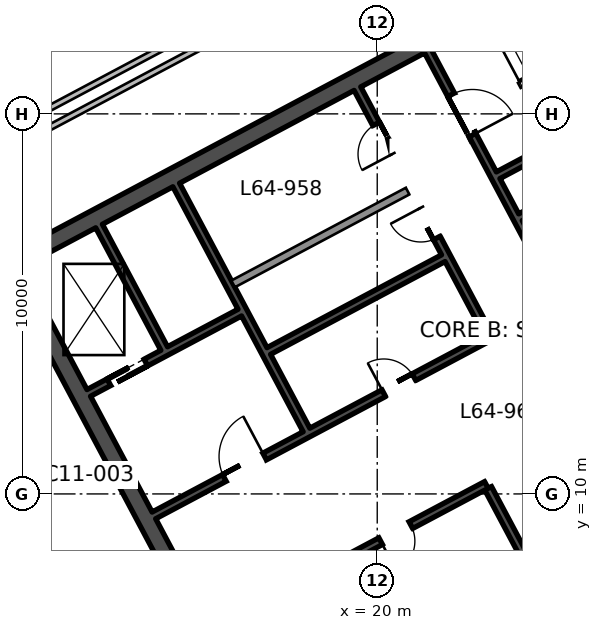
"""IFC4 building model, lengths in metres.
Left out: names, types, materials, properties, quantities, classifications, styles, units other than length and angle.
Written with IfcOpenShell. Run it as: python <this file> out.ifc"""

import sys

from ifc_helpers import new_model, si_unit, direction, frame, frame_2d, origin, place, context, subcontext, project, spatial, rectangle, extrude, element, fill, save


model = new_model("IFC4")
c1 = context("Model", 3, precision=1e-05, world=origin(), true_north=direction((0.0, 1.0)))
c2 = subcontext(c1, "Body", "Model", "MODEL_VIEW")
j1 = project(units=[si_unit("LENGTHUNIT", "METRE"), si_unit("PLANEANGLEUNIT", "RADIAN")], contexts=[c1])
p1 = place(None, origin())
s1 = spatial("IfcSite", under=j1, at=p1, CompositionType="ELEMENT")
p2 = place(p1, origin())
s2 = spatial("IfcBuilding", under=s1, at=p2, CompositionType="ELEMENT")
p3 = place(p2, frame((0.0, 0.0, 285.3)))
s3 = spatial("IfcBuildingStorey", under=s2, at=p3, CompositionType="ELEMENT", Elevation=285.3)
p4 = place(p3, frame((19.207, -0.604, 0.0), z_axis=(0.0, 0.0, 1.0), x_axis=(-0.469467968382, 0.882949504028, 0.0)))
e1 = element("IfcWall", 1, at=p4, inside=s3, PredefinedType="SHEAR", context=c2, shape_type="SweptSolid", body=[
    extrude(rectangle(XDim=19.1, YDim=0.45, at=frame_2d((9.55, 0.0))), origin(), (0.0, 0.0, 1.0), 3.9),
])
p5 = place(p4, frame((6.55, 0.0, 0.0)))
e2 = element("IfcOpeningElement", 2, at=p5, cuts=e1, PredefinedType="OPENING", context=c2, shape_type="SweptSolid", body=[
    extrude(rectangle(XDim=2.4, YDim=2.4, at=frame_2d((1.2, 1.2))), frame((0.0, 0.235, 0.0), z_axis=(0.0, -1.0, 0.0), x_axis=(1.0, 0.0, 0.0)), (0.0, 0.0, 1.0), 0.47),
])
p6 = place(p3, frame((19.3, -0.299, 0.0), z_axis=(0.0, 0.0, 1.0), x_axis=(0.88295276571, 0.46946183394, 0.0)))
e3 = element("IfcWall", 3, at=p6, inside=s3, PredefinedType="SHEAR", context=c2, shape_type="SweptSolid", body=[
    extrude(rectangle(XDim=20.2, YDim=0.45, at=frame_2d((10.1, 0.0))), origin(), (0.0, 0.0, 1.0), 3.9),
])
p7 = place(p3, frame((10.544, 16.167, 0.0), z_axis=(0.0, 0.0, 1.0), x_axis=(0.882947755831, 0.46947125628, 0.0)))
e4 = element("IfcWall", 4, at=p7, inside=s3, PredefinedType="SHEAR", context=c2, shape_type="SweptSolid", body=[
    extrude(rectangle(XDim=20.2, YDim=0.45, at=frame_2d((10.1, 0.0))), origin(), (0.0, 0.0, 1.0), 3.9),
])
p8 = place(p3, frame((14.394, 13.826, 0.0), z_axis=(0.0, 0.0, 1.0), x_axis=(-0.469494272526, 0.882935517501, 0.0)))
e5 = element("IfcWall", 5, at=p8, inside=s3, PredefinedType="SHEAR", context=c2, shape_type="SweptSolid", body=[
    extrude(rectangle(XDim=3.65, YDim=0.2, at=frame_2d((1.825, 0.0))), origin(), (0.0, 0.0, 1.0), 3.9),
])
p9 = place(p3, frame((18.138, 11.683, 0.0), z_axis=(0.0, 0.0, 1.0), x_axis=(-0.469480409012, 0.88294288918, 0.0)))
e6 = element("IfcWall", 6, at=p9, inside=s3, PredefinedType="SHEAR", context=c2, shape_type="SweptSolid", body=[
    extrude(rectangle(XDim=7.3, YDim=0.2, at=frame_2d((3.65, 0.0))), origin(), (0.0, 0.0, 1.0), 3.9),
])
p10 = place(p3, frame((26.346, 3.702, 0.0), z_axis=(0.0, 0.0, 1.0), x_axis=(-0.469480409012, 0.88294288918, 0.0)))
e7 = element("IfcWall", 7, at=p10, inside=s3, PredefinedType="SHEAR", context=c2, shape_type="SweptSolid", body=[
    extrude(rectangle(XDim=7.3, YDim=0.2, at=frame_2d((3.65, 0.0))), origin(), (0.0, 0.0, 1.0), 3.9),
])
p11 = place(p10, frame((1.3, 0.0, 0.0)))
e8 = element("IfcOpeningElement", 8, at=p11, cuts=e7, PredefinedType="OPENING", context=c2, shape_type="SweptSolid", body=[
    extrude(rectangle(XDim=1.2, YDim=2.1, at=frame_2d((0.6, 1.05))), frame((0.0, 0.11, 0.0), z_axis=(0.0, -1.0, 0.0), x_axis=(1.0, 0.0, 0.0)), (0.0, 0.0, 1.0), 0.22),
])
p12 = place(p3, frame((22.906, 14.218, 0.0), z_axis=(0.0, 0.0, 1.0), x_axis=(-0.469480409012, 0.88294288918, 0.0)))
e9 = element("IfcWall", 9, at=p12, inside=s3, PredefinedType="SHEAR", context=c2, shape_type="SweptSolid", body=[
    extrude(rectangle(XDim=7.3, YDim=0.2, at=frame_2d((3.65, 0.0))), origin(), (0.0, 0.0, 1.0), 3.9),
])
p13 = place(p12, frame((2.85, 0.0, 0.0)))
e10 = element("IfcOpeningElement", 10, at=p13, cuts=e9, PredefinedType="OPENING", context=c2, shape_type="SweptSolid", body=[
    extrude(rectangle(XDim=0.9, YDim=2.1, at=frame_2d((0.45, 1.05))), frame((0.0, 0.11, 0.0), z_axis=(0.0, -1.0, 0.0), x_axis=(1.0, 0.0, 0.0)), (0.0, 0.0, 1.0), 0.22),
])
p14 = place(p12, frame((5.35, 0.0, 0.0)))
e11 = element("IfcOpeningElement", 11, at=p14, cuts=e9, PredefinedType="OPENING", context=c2, shape_type="SweptSolid", body=[
    extrude(rectangle(XDim=0.9, YDim=2.1, at=frame_2d((0.45, 1.05))), frame((0.0, 0.11, 0.0), z_axis=(0.0, -1.0, 0.0), x_axis=(1.0, 0.0, 0.0)), (0.0, 0.0, 1.0), 0.22),
])
p15 = place(p3, frame((24.76, 15.204, 0.0), z_axis=(0.0, 0.0, 1.0), x_axis=(-0.469494272526, 0.882935517501, 0.0)))
e12 = element("IfcWall", 12, at=p15, inside=s3, PredefinedType="SHEAR", context=c2, shape_type="SweptSolid", body=[
    extrude(rectangle(XDim=7.3, YDim=0.2, at=frame_2d((3.65, 0.0))), origin(), (0.0, 0.0, 1.0), 3.9),
])
p16 = place(p15, frame((4.8, 0.0, 0.0)))
e13 = element("IfcOpeningElement", 13, at=p16, cuts=e12, PredefinedType="OPENING", context=c2, shape_type="SweptSolid", body=[
    extrude(rectangle(XDim=1.2, YDim=2.1, at=frame_2d((0.6, 1.05))), frame((0.0, 0.11, 0.0), z_axis=(0.0, -1.0, 0.0), x_axis=(1.0, 0.0, 0.0)), (0.0, 0.0, 1.0), 0.22),
])
p17 = place(p3, frame((18.104, 7.701, 0.0), z_axis=(0.0, 0.0, 1.0), x_axis=(0.882952937579, 0.469461510692, 0.0)))
e14 = element("IfcWall", 14, at=p17, inside=s3, PredefinedType="SHEAR", context=c2, shape_type="SweptSolid", body=[
    extrude(rectangle(XDim=5.4, YDim=0.2, at=frame_2d((2.7, 0.0))), origin(), (0.0, 0.0, 1.0), 3.9),
])
p18 = place(p17, frame((2.25, 0.0, 0.0)))
e15 = element("IfcOpeningElement", 15, at=p18, cuts=e14, PredefinedType="OPENING", context=c2, shape_type="SweptSolid", body=[
    extrude(rectangle(XDim=0.9, YDim=2.1, at=frame_2d((0.45, 1.05))), frame((0.0, 0.11, 0.0), z_axis=(0.0, -1.0, 0.0), x_axis=(1.0, 0.0, 0.0)), (0.0, 0.0, 1.0), 0.22),
])
p19 = place(p3, frame((14.124, 9.435, 0.0), z_axis=(0.0, 0.0, 1.0), x_axis=(0.882940221191, 0.469485426614, 0.0)))
e16 = element("IfcWall", 16, at=p19, inside=s3, PredefinedType="SHEAR", context=c2, shape_type="SweptSolid", body=[
    extrude(rectangle(XDim=10.0, YDim=0.2, at=frame_2d((5.0, 0.0))), origin(), (0.0, 0.0, 1.0), 3.9),
])
p20 = place(p19, frame((2.1, 0.0, 0.0)))
e17 = element("IfcOpeningElement", 17, at=p20, cuts=e16, PredefinedType="OPENING", context=c2, shape_type="SweptSolid", body=[
    extrude(rectangle(XDim=1.2, YDim=2.1, at=frame_2d((0.6, 1.05))), frame((0.0, 0.11, 0.0), z_axis=(0.0, -1.0, 0.0), x_axis=(1.0, 0.0, 0.0)), (0.0, 0.0, 1.0), 0.22),
])
p21 = place(p19, frame((6.85, 0.0, 0.0)))
e18 = element("IfcOpeningElement", 18, at=p21, cuts=e16, PredefinedType="OPENING", context=c2, shape_type="SweptSolid", body=[
    extrude(rectangle(XDim=0.9, YDim=2.1, at=frame_2d((0.45, 1.05))), frame((0.0, 0.11, 0.0), z_axis=(0.0, -1.0, 0.0), x_axis=(1.0, 0.0, 0.0)), (0.0, 0.0, 1.0), 0.22),
])
p22 = place(p3, frame((17.147, 13.761, 0.0), z_axis=(0.0, 0.0, 1.0), x_axis=(0.882964314875, 0.469440111896, 0.0)))
e19 = element("IfcWall", 19, at=p22, inside=s3, PredefinedType="SHEAR", context=c2, shape_type="SweptSolid", body=[
    extrude(rectangle(XDim=5.2, YDim=0.2, at=frame_2d((2.6, 0.0))), origin(), (0.0, 0.0, 1.0), 3.9),
])
p23 = place(p3, frame((23.769, 17.282, 0.0), z_axis=(0.0, 0.0, 1.0), x_axis=(0.882940221191, 0.469485426614, 0.0)))
e20 = element("IfcWall", 20, at=p23, inside=s3, PredefinedType="SHEAR", context=c2, shape_type="SweptSolid", body=[
    extrude(rectangle(XDim=8.0, YDim=0.2, at=frame_2d((4.0, 0.0))), origin(), (0.0, 0.0, 1.0), 3.9),
])
p24 = place(p3, frame((12.41, 12.658, 0.0), z_axis=(0.0, 0.0, 1.0), x_axis=(0.8829484765, 0.469469900894, 0.0)))
e21 = element("IfcWall", 21, at=p24, inside=s3, PredefinedType="SHEAR", context=c2, shape_type="SweptSolid", body=[
    extrude(rectangle(XDim=4.5, YDim=0.2, at=frame_2d((2.25, 0.0))), origin(), (0.0, 0.0, 1.0), 3.9),
])
p25 = place(p24, frame((0.6, 0.0, 0.0)))
e22 = element("IfcOpeningElement", 22, at=p25, cuts=e21, PredefinedType="OPENING", context=c2, shape_type="SweptSolid", body=[
    extrude(rectangle(XDim=1.1, YDim=2.1, at=frame_2d((0.55, 1.05))), frame((0.0, 0.11, 0.0), z_axis=(0.0, -1.0, 0.0), x_axis=(1.0, 0.0, 0.0)), (0.0, 0.0, 1.0), 0.22),
])
p26 = place(p3, frame((23.182, 18.385, 0.0), z_axis=(0.0, 0.0, 1.0), x_axis=(0.88295287151, 0.469461634952, 0.0)))
e23 = element("IfcWall", 23, at=p26, inside=s3, PredefinedType="SHEAR", context=c2, shape_type="SweptSolid", body=[
    extrude(rectangle(XDim=8.0, YDim=0.2, at=frame_2d((4.0, 0.0))), origin(), (0.0, 0.0, 1.0), 3.9),
])
p27 = place(p3, frame((16.208, 15.527, 0.0), z_axis=(0.0, 0.0, 1.0), x_axis=(0.882953967957, 0.469459572775, 0.0)))
e24 = element("IfcWall", 24, at=p27, inside=s3, PredefinedType="SOLIDWALL", context=c2, shape_type="SweptSolid", body=[
    extrude(rectangle(XDim=5.2, YDim=0.2, at=frame_2d((2.6, 0.0))), origin(), (0.0, 0.0, 1.0), 3.9),
])
p28 = place(p3, frame((0.0, 14.1, 0.0), z_axis=(0.0, 0.0, 1.0), x_axis=(0.882935523368, 0.469494261493, 0.0)))
e25 = element("IfcWall", 25, at=p28, inside=s3, PredefinedType="PARTITIONING", context=c2, shape_type="SweptSolid", body=[
    extrude(rectangle(XDim=24.831, YDim=0.15, at=frame_2d((12.416, 0.0))), origin(), (0.0, 0.0, 1.0), 3.54),
])
p29 = place(p3, frame((22.135, 25.36, 0.0), z_axis=(0.0, 0.0, 1.0), x_axis=(-0.882945198202, -0.469476066453, 0.0)))
e26 = element("IfcWall", 26, at=p29, inside=s3, PredefinedType="PARTITIONING", context=c2, shape_type="SweptSolid", body=[
    extrude(rectangle(XDim=17.449, YDim=0.15, at=frame_2d((8.725, 0.0))), origin(), (0.0, 0.0, 1.0), 3.54),
])
p30 = place(p3, frame((1.406, 21.134, 0.0), z_axis=(0.0, 0.0, 1.0), x_axis=(0.88296030725, 0.469447649713, 0.0)))
e27 = element("IfcWall", 27, at=p30, inside=s3, PredefinedType="PARTITIONING", context=c2, shape_type="SweptSolid", body=[
    extrude(rectangle(XDim=15.503, YDim=0.15, at=frame_2d((7.752, 0.0))), origin(), (0.0, 0.0, 1.0), 3.54),
])
p31 = place(p3, frame((1.865, 17.811, 0.0), z_axis=(0.0, 0.0, 1.0), x_axis=(0.882960942519, 0.469446454866, 0.0)))
e28 = element("IfcWall", 28, at=p31, inside=s3, PredefinedType="PARTITIONING", context=c2, shape_type="SweptSolid", body=[
    extrude(rectangle(XDim=22.493, YDim=0.15, at=frame_2d((11.246, 0.0))), origin(), (0.0, 0.0, 1.0), 3.54),
])
p32 = place(p31, frame((10.75, 0.0, 0.0)))
e29 = element("IfcOpeningElement", 29, at=p32, cuts=e28, PredefinedType="OPENING", context=c2, shape_type="SweptSolid", body=[
    extrude(rectangle(XDim=1.0, YDim=2.1, at=frame_2d((0.5, 1.05))), frame((0.0, 0.085, 0.0), z_axis=(0.0, -1.0, 0.0), x_axis=(1.0, 0.0, 0.0)), (0.0, 0.0, 1.0), 0.17),
])
p33 = place(p20, origin())
e30 = element("IfcDoor", 30, at=p33, inside=s3, OperationType="SINGLE_SWING_RIGHT", PredefinedType="DOOR", context=c2, shape_type="SweptSolid", body=[
    extrude(rectangle(XDim=1.2, YDim=2.1, at=frame_2d((0.6, 1.05))), frame((0.0, 0.025, 0.0), z_axis=(0.0, -1.0, 0.0), x_axis=(1.0, 0.0, 0.0)), (0.0, 0.0, 1.0), 0.05),
])
fill(e17, e30)
p34 = place(p16, frame((1.2, 0.0, 0.0), z_axis=(0.0, 0.0, 1.0), x_axis=(-1.0, 0.0, 0.0)))
e31 = element("IfcDoor", 31, at=p34, inside=s3, OperationType="SINGLE_SWING_RIGHT", PredefinedType="DOOR", context=c2, shape_type="SweptSolid", body=[
    extrude(rectangle(XDim=1.2, YDim=2.1, at=frame_2d((0.6, 1.05))), frame((0.0, 0.025, 0.0), z_axis=(0.0, -1.0, 0.0), x_axis=(1.0, 0.0, 0.0)), (0.0, 0.0, 1.0), 0.05),
])
fill(e13, e31)
p35 = place(p21, origin())
e32 = element("IfcDoor", 32, at=p35, inside=s3, OperationType="SINGLE_SWING_LEFT", PredefinedType="DOOR", context=c2, shape_type="SweptSolid", body=[
    extrude(rectangle(XDim=0.9, YDim=2.1, at=frame_2d((0.45, 1.05))), frame((0.0, 0.025, 0.0), z_axis=(0.0, -1.0, 0.0), x_axis=(1.0, 0.0, 0.0)), (0.0, 0.0, 1.0), 0.05),
])
fill(e18, e32)
p36 = place(p18, frame((0.9, 0.0, 0.0), z_axis=(0.0, 0.0, 1.0), x_axis=(-1.0, 0.0, 0.0)))
e33 = element("IfcDoor", 33, at=p36, inside=s3, OperationType="SINGLE_SWING_RIGHT", PredefinedType="DOOR", context=c2, shape_type="SweptSolid", body=[
    extrude(rectangle(XDim=0.9, YDim=2.1, at=frame_2d((0.45, 1.05))), frame((0.0, 0.025, 0.0), z_axis=(0.0, -1.0, 0.0), x_axis=(1.0, 0.0, 0.0)), (0.0, 0.0, 1.0), 0.05),
])
fill(e15, e33)
p37 = place(p25, origin())
e34 = element("IfcDoor", 34, at=p37, inside=s3, OperationType="DOUBLE_DOOR_SLIDING", PredefinedType="DOOR", context=c2, shape_type="SweptSolid", body=[
    extrude(rectangle(XDim=1.1, YDim=2.1, at=frame_2d((0.55, 1.05))), frame((0.0, 0.025, 0.0), z_axis=(0.0, -1.0, 0.0), x_axis=(1.0, 0.0, 0.0)), (0.0, 0.0, 1.0), 0.05),
])
fill(e22, e34)
p38 = place(p13, origin())
e35 = element("IfcDoor", 35, at=p38, inside=s3, OperationType="SINGLE_SWING_RIGHT", PredefinedType="DOOR", context=c2, shape_type="SweptSolid", body=[
    extrude(rectangle(XDim=0.9, YDim=2.1, at=frame_2d((0.45, 1.05))), frame((0.0, 0.025, 0.0), z_axis=(0.0, -1.0, 0.0), x_axis=(1.0, 0.0, 0.0)), (0.0, 0.0, 1.0), 0.05),
])
fill(e10, e35)
p39 = place(p14, origin())
e36 = element("IfcDoor", 36, at=p39, inside=s3, OperationType="SINGLE_SWING_LEFT", PredefinedType="DOOR", context=c2, shape_type="SweptSolid", body=[
    extrude(rectangle(XDim=0.9, YDim=2.1, at=frame_2d((0.45, 1.05))), frame((0.0, 0.025, 0.0), z_axis=(0.0, -1.0, 0.0), x_axis=(1.0, 0.0, 0.0)), (0.0, 0.0, 1.0), 0.05),
])
fill(e11, e36)
save(model, sys.argv[1])
